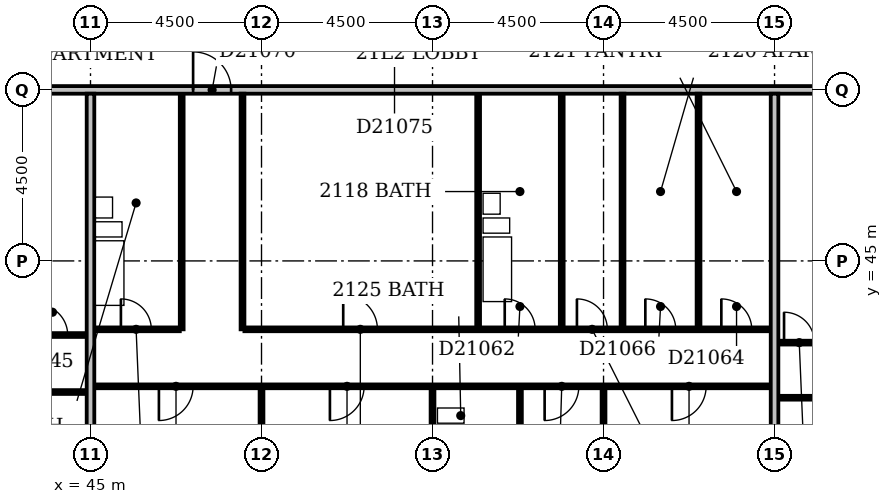
"""IFC4 building model, lengths in metres.
Left out: names, types, materials, properties, quantities, classifications, styles, units other than length and angle.
Written with IfcOpenShell. Run it as: python <this file> out.ifc"""

import sys

from ifc_helpers import new_model, si_unit, direction, frame, frame_2d, origin, place, context, subcontext, project, spatial, rectangle, extrude, element, fill, save


model = new_model("IFC4")
c1 = context("Model", 3, precision=1e-05, world=origin(), true_north=direction((0.0, 1.0)))
c2 = subcontext(c1, "Body", "Model", "MODEL_VIEW")
j1 = project(units=[si_unit("LENGTHUNIT", "METRE"), si_unit("PLANEANGLEUNIT", "RADIAN")], contexts=[c1])
p1 = place(None, origin())
s1 = spatial("IfcSite", under=j1, at=p1, CompositionType="ELEMENT")
p2 = place(p1, origin())
s2 = spatial("IfcBuilding", under=s1, at=p2, CompositionType="ELEMENT")
p3 = place(p2, frame((0.0, 0.0, 86.6)))
s3 = spatial("IfcBuildingStorey", under=s2, at=p3, CompositionType="ELEMENT", Elevation=86.6)
p4 = place(p3, frame((45.0, 36.6, 0.0), z_axis=(0.0, 0.0, 1.0), x_axis=(0.0, 1.0, 0.0)))
e1 = element("IfcWall", 1, at=p4, inside=s3, PredefinedType="PARTITIONING", context=c2, shape_type="SweptSolid", body=[
    extrude(rectangle(XDim=12.8, YDim=0.2, at=frame_2d((6.4, 0.0))), origin(), (0.0, 0.0, 1.0), 2.6),
])
p5 = place(p3, frame((49.5, 36.6, 0.0), z_axis=(0.0, 0.0, 1.0), x_axis=(0.0, 1.0, 0.0)))
e2 = element("IfcWall", 2, at=p5, inside=s3, PredefinedType="PARTITIONING", context=c2, shape_type="SweptSolid", body=[
    extrude(rectangle(XDim=5.05, YDim=0.1, at=frame_2d((2.525, 0.0))), origin(), (0.0, 0.0, 1.0), 3.3),
])
p6 = place(p3, frame((54.0, 36.6, 0.0), z_axis=(0.0, 0.0, 1.0), x_axis=(0.0, 1.0, 0.0)))
e3 = element("IfcWall", 3, at=p6, inside=s3, PredefinedType="PARTITIONING", context=c2, shape_type="SweptSolid", body=[
    extrude(rectangle(XDim=5.05, YDim=0.1, at=frame_2d((2.525, 0.0))), origin(), (0.0, 0.0, 1.0), 2.6),
])
p7 = place(p3, frame((58.5, 36.6, 0.0), z_axis=(0.0, 0.0, 1.0), x_axis=(0.0, 1.0, 0.0)))
e4 = element("IfcWall", 4, at=p7, inside=s3, PredefinedType="PARTITIONING", context=c2, shape_type="SweptSolid", body=[
    extrude(rectangle(XDim=5.05, YDim=0.1, at=frame_2d((2.525, 0.0))), origin(), (0.0, 0.0, 1.0), 3.3),
])
p8 = place(p3, frame((63.0, 36.6, 0.0), z_axis=(0.0, 0.0, 1.0), x_axis=(0.0, 1.0, 0.0)))
e5 = element("IfcWall", 5, at=p8, inside=s3, PredefinedType="PARTITIONING", context=c2, shape_type="SweptSolid", body=[
    extrude(rectangle(XDim=12.8, YDim=0.2, at=frame_2d((6.4, 0.0))), origin(), (0.0, 0.0, 1.0), 2.4),
])
p9 = place(p3, frame((56.3, 38.8, 0.0), z_axis=(0.0, 0.0, 1.0), x_axis=(0.0, 1.0, 0.0)))
e6 = element("IfcWall", 6, at=p9, inside=s3, PredefinedType="PLUMBINGWALL", context=c2, shape_type="SweptSolid", body=[
    extrude(rectangle(XDim=2.85, YDim=0.1, at=frame_2d((1.425, 0.0))), origin(), (0.0, 0.0, 1.0), 3.3),
])
p10 = place(p9, frame((1.05, 0.0, 0.0)))
e7 = element("IfcOpeningElement", 7, at=p10, cuts=e6, PredefinedType="OPENING", context=c2, shape_type="SweptSolid", body=[
    extrude(rectangle(XDim=0.8, YDim=2.1, at=frame_2d((0.4, 1.05))), frame((0.0, 0.062, 0.0), z_axis=(0.0, -1.0, 0.0), x_axis=(1.0, 0.0, 0.0)), (0.0, 0.0, 1.0), 0.124),
])
p11 = place(p3, frame((63.1, 41.4, 0.0), z_axis=(0.0, 0.0, 1.0), x_axis=(1.0, 0.0, 0.0)))
e8 = element("IfcWall", 8, at=p11, inside=s3, PredefinedType="PARTITIONING", context=c2, shape_type="SweptSolid", body=[
    extrude(rectangle(XDim=5.0, YDim=0.1, at=frame_2d((2.5, 0.0))), origin(), (0.0, 0.0, 1.0), 3.3),
])
p12 = place(p11, frame((1.7, 0.0, 0.0)))
e9 = element("IfcOpeningElement", 9, at=p12, cuts=e8, PredefinedType="OPENING", context=c2, shape_type="SweptSolid", body=[
    extrude(rectangle(XDim=0.9, YDim=2.1, at=frame_2d((0.45, 1.05))), frame((0.0, 0.062, 0.0), z_axis=(0.0, -1.0, 0.0), x_axis=(1.0, 0.0, 0.0)), (0.0, 0.0, 1.0), 0.124),
])
p13 = place(p3, frame((31.6, 41.55, 0.0), z_axis=(0.0, 0.0, 1.0), x_axis=(1.0, 0.0, 0.0)))
e10 = element("IfcWall", 10, at=p13, inside=s3, PredefinedType="PARTITIONING", context=c2, shape_type="SweptSolid", body=[
    extrude(rectangle(XDim=13.3, YDim=0.1, at=frame_2d((6.65, 0.0))), origin(), (0.0, 0.0, 1.0), 3.3),
])
p14 = place(p13, frame((3.9, 0.0, 0.0)))
e11 = element("IfcOpeningElement", 11, at=p14, cuts=e10, PredefinedType="OPENING", context=c2, shape_type="SweptSolid", body=[
    extrude(rectangle(XDim=0.9, YDim=2.1, at=frame_2d((0.45, 1.05))), frame((0.0, 0.062, 0.0), z_axis=(0.0, -1.0, 0.0), x_axis=(1.0, 0.0, 0.0)), (0.0, 0.0, 1.0), 0.124),
])
p15 = place(p13, frame((10.7, 0.0, 0.0)))
e12 = element("IfcOpeningElement", 12, at=p15, cuts=e10, PredefinedType="OPENING", context=c2, shape_type="SweptSolid", body=[
    extrude(rectangle(XDim=0.9, YDim=2.1, at=frame_2d((0.45, 1.05))), frame((0.0, 0.062, 0.0), z_axis=(0.0, -1.0, 0.0), x_axis=(1.0, 0.0, 0.0)), (0.0, 0.0, 1.0), 0.124),
])
p16 = place(p3, frame((45.1, 41.7, 0.0), z_axis=(0.0, 0.0, 1.0), x_axis=(1.0, 0.0, 0.0)))
e13 = element("IfcWall", 13, at=p16, inside=s3, PredefinedType="PARTITIONING", context=c2, shape_type="SweptSolid", body=[
    extrude(rectangle(XDim=17.8, YDim=0.1, at=frame_2d((8.9, 0.0))), origin(), (0.0, 0.0, 1.0), 3.3),
])
p17 = place(p16, frame((1.7, 0.0, 0.0)))
e14 = element("IfcOpeningElement", 14, at=p17, cuts=e13, PredefinedType="OPENING", context=c2, shape_type="SweptSolid", body=[
    extrude(rectangle(XDim=0.9, YDim=2.1, at=frame_2d((0.45, 1.05))), frame((0.0, 0.062, 0.0), z_axis=(0.0, -1.0, 0.0), x_axis=(1.0, 0.0, 0.0)), (0.0, 0.0, 1.0), 0.124),
])
p18 = place(p16, frame((6.2, 0.0, 0.0)))
e15 = element("IfcOpeningElement", 15, at=p18, cuts=e13, PredefinedType="OPENING", context=c2, shape_type="SweptSolid", body=[
    extrude(rectangle(XDim=0.9, YDim=2.1, at=frame_2d((0.45, 1.05))), frame((0.0, 0.062, 0.0), z_axis=(0.0, -1.0, 0.0), x_axis=(1.0, 0.0, 0.0)), (0.0, 0.0, 1.0), 0.124),
])
p19 = place(p16, frame((11.85, 0.0, 0.0)))
e16 = element("IfcOpeningElement", 16, at=p19, cuts=e13, PredefinedType="OPENING", context=c2, shape_type="SweptSolid", body=[
    extrude(rectangle(XDim=0.9, YDim=2.1, at=frame_2d((0.45, 1.05))), frame((0.0, 0.062, 0.0), z_axis=(0.0, -1.0, 0.0), x_axis=(1.0, 0.0, 0.0)), (0.0, 0.0, 1.0), 0.124),
])
p20 = place(p16, frame((15.2, 0.0, 0.0)))
e17 = element("IfcOpeningElement", 17, at=p20, cuts=e13, PredefinedType="OPENING", context=c2, shape_type="SweptSolid", body=[
    extrude(rectangle(XDim=0.9, YDim=2.1, at=frame_2d((0.45, 1.05))), frame((0.0, 0.062, 0.0), z_axis=(0.0, -1.0, 0.0), x_axis=(1.0, 0.0, 0.0)), (0.0, 0.0, 1.0), 0.124),
])
p21 = place(p3, frame((63.1, 42.85, 0.0), z_axis=(0.0, 0.0, 1.0), x_axis=(1.0, 0.0, 0.0)))
e18 = element("IfcWall", 18, at=p21, inside=s3, PredefinedType="PARTITIONING", context=c2, shape_type="SweptSolid", body=[
    extrude(rectangle(XDim=1.15, YDim=0.1, at=frame_2d((0.575, 0.0))), origin(), (0.0, 0.0, 1.0), 3.3),
])
p22 = place(p21, frame((0.15, 0.0, 0.0)))
e19 = element("IfcOpeningElement", 19, at=p22, cuts=e18, PredefinedType="OPENING", context=c2, shape_type="SweptSolid", body=[
    extrude(rectangle(XDim=0.8, YDim=2.1, at=frame_2d((0.4, 1.05))), frame((0.0, 0.062, 0.0), z_axis=(0.0, -1.0, 0.0), x_axis=(1.0, 0.0, 0.0)), (0.0, 0.0, 1.0), 0.124),
])
p23 = place(p3, frame((33.15, 43.05, 0.0), z_axis=(0.0, 0.0, 1.0), x_axis=(1.0, 0.0, 0.0)))
e20 = element("IfcWall", 20, at=p23, inside=s3, PredefinedType="PARTITIONING", context=c2, shape_type="SweptSolid", body=[
    extrude(rectangle(XDim=11.75, YDim=0.1, at=frame_2d((5.875, 0.0))), origin(), (0.0, 0.0, 1.0), 3.3),
])
p24 = place(p23, frame((5.15, 0.0, 0.0)))
e21 = element("IfcOpeningElement", 21, at=p24, cuts=e20, PredefinedType="OPENING", context=c2, shape_type="SweptSolid", body=[
    extrude(rectangle(XDim=0.8, YDim=2.1, at=frame_2d((0.4, 1.05))), frame((0.0, 0.062, 0.0), z_axis=(0.0, -1.0, 0.0), x_axis=(1.0, 0.0, 0.0)), (0.0, 0.0, 1.0), 0.124),
])
p25 = place(p23, frame((1.7, 0.0, 0.0)))
e22 = element("IfcOpeningElement", 22, at=p25, cuts=e20, PredefinedType="OPENING", context=c2, shape_type="SweptSolid", body=[
    extrude(rectangle(XDim=0.9, YDim=2.1, at=frame_2d((0.45, 1.05))), frame((0.0, 0.062, 0.0), z_axis=(0.0, -1.0, 0.0), x_axis=(1.0, 0.0, 0.0)), (0.0, 0.0, 1.0), 0.124),
])
p26 = place(p23, frame((8.65, 0.0, 0.0)))
e23 = element("IfcOpeningElement", 23, at=p26, cuts=e20, PredefinedType="OPENING", context=c2, shape_type="SweptSolid", body=[
    extrude(rectangle(XDim=0.8, YDim=2.1, at=frame_2d((0.4, 1.05))), frame((0.0, 0.062, 0.0), z_axis=(0.0, -1.0, 0.0), x_axis=(1.0, 0.0, 0.0)), (0.0, 0.0, 1.0), 0.124),
])
p27 = place(p23, frame((10.45, 0.0, 0.0)))
e24 = element("IfcOpeningElement", 24, at=p27, cuts=e20, PredefinedType="OPENING", context=c2, shape_type="SweptSolid", body=[
    extrude(rectangle(XDim=0.8, YDim=2.1, at=frame_2d((0.4, 1.05))), frame((0.0, 0.062, 0.0), z_axis=(0.0, -1.0, 0.0), x_axis=(1.0, 0.0, 0.0)), (0.0, 0.0, 1.0), 0.124),
])
p28 = place(p23, frame((7.1, 0.0, 0.0)))
e25 = element("IfcOpeningElement", 25, at=p28, cuts=e20, PredefinedType="OPENING", context=c2, shape_type="SweptSolid", body=[
    extrude(rectangle(XDim=0.8, YDim=2.1, at=frame_2d((0.4, 1.05))), frame((0.0, 0.062, 0.0), z_axis=(0.0, -1.0, 0.0), x_axis=(1.0, 0.0, 0.0)), (0.0, 0.0, 1.0), 0.124),
])
p29 = place(p3, frame((45.1, 43.2, 0.0), z_axis=(0.0, 0.0, 1.0), x_axis=(1.0, 0.0, 0.0)))
e26 = element("IfcWall", 26, at=p29, inside=s3, PredefinedType="PARTITIONING", context=c2, shape_type="SweptSolid", body=[
    extrude(rectangle(XDim=2.25, YDim=0.1, at=frame_2d((1.125, 0.0))), origin(), (0.0, 0.0, 1.0), 3.3),
])
p30 = place(p29, frame((0.7, 0.0, 0.0)))
e27 = element("IfcOpeningElement", 27, at=p30, cuts=e26, PredefinedType="OPENING", context=c2, shape_type="SweptSolid", body=[
    extrude(rectangle(XDim=0.8, YDim=2.1, at=frame_2d((0.4, 1.05))), frame((0.0, 0.062, 0.0), z_axis=(0.0, -1.0, 0.0), x_axis=(1.0, 0.0, 0.0)), (0.0, 0.0, 1.0), 0.124),
])
p31 = place(p3, frame((47.4, 43.2, 0.0), z_axis=(0.0, 0.0, 1.0), x_axis=(0.0, 1.0, 0.0)))
e28 = element("IfcWall", 28, at=p31, inside=s3, PredefinedType="PLUMBINGWALL", context=c2, shape_type="SweptSolid", body=[
    extrude(rectangle(XDim=6.2, YDim=0.1, at=frame_2d((3.1, 0.0))), origin(), (0.0, 0.0, 1.0), 3.3),
])
p32 = place(p3, frame((49.0, 43.2, 0.0), z_axis=(0.0, 0.0, 1.0), x_axis=(0.0, 1.0, 0.0)))
e29 = element("IfcWall", 29, at=p32, inside=s3, PredefinedType="PARTITIONING", context=c2, shape_type="SweptSolid", body=[
    extrude(rectangle(XDim=6.2, YDim=0.1, at=frame_2d((3.1, 0.0))), origin(), (0.0, 0.0, 1.0), 3.3),
])
p33 = place(p3, frame((49.05, 43.2, 0.0), z_axis=(0.0, 0.0, 1.0), x_axis=(1.0, 0.0, 0.0)))
e30 = element("IfcWall", 30, at=p33, inside=s3, PredefinedType="PARTITIONING", context=c2, shape_type="SweptSolid", body=[
    extrude(rectangle(XDim=13.85, YDim=0.1, at=frame_2d((6.925, 0.0))), origin(), (0.0, 0.0, 1.0), 3.3),
])
p34 = place(p33, frame((6.85, 0.0, 0.0)))
e31 = element("IfcOpeningElement", 31, at=p34, cuts=e30, PredefinedType="OPENING", context=c2, shape_type="SweptSolid", body=[
    extrude(rectangle(XDim=0.8, YDim=2.1, at=frame_2d((0.4, 1.05))), frame((0.0, 0.062, 0.0), z_axis=(0.0, -1.0, 0.0), x_axis=(1.0, 0.0, 0.0)), (0.0, 0.0, 1.0), 0.124),
])
p35 = place(p33, frame((2.6, 0.0, 0.0)))
e32 = element("IfcOpeningElement", 32, at=p35, cuts=e30, PredefinedType="OPENING", context=c2, shape_type="SweptSolid", body=[
    extrude(rectangle(XDim=0.9, YDim=2.1, at=frame_2d((0.45, 1.05))), frame((0.0, 0.062, 0.0), z_axis=(0.0, -1.0, 0.0), x_axis=(1.0, 0.0, 0.0)), (0.0, 0.0, 1.0), 0.124),
])
p36 = place(p33, frame((12.55, 0.0, 0.0)))
e33 = element("IfcOpeningElement", 33, at=p36, cuts=e30, PredefinedType="OPENING", context=c2, shape_type="SweptSolid", body=[
    extrude(rectangle(XDim=0.8, YDim=2.1, at=frame_2d((0.4, 1.05))), frame((0.0, 0.062, 0.0), z_axis=(0.0, -1.0, 0.0), x_axis=(1.0, 0.0, 0.0)), (0.0, 0.0, 1.0), 0.124),
])
p37 = place(p33, frame((8.75, 0.0, 0.0)))
e34 = element("IfcOpeningElement", 34, at=p37, cuts=e30, PredefinedType="OPENING", context=c2, shape_type="SweptSolid", body=[
    extrude(rectangle(XDim=0.8, YDim=2.1, at=frame_2d((0.4, 1.05))), frame((0.0, 0.062, 0.0), z_axis=(0.0, -1.0, 0.0), x_axis=(1.0, 0.0, 0.0)), (0.0, 0.0, 1.0), 0.124),
])
p38 = place(p33, frame((10.55, 0.0, 0.0)))
e35 = element("IfcOpeningElement", 35, at=p38, cuts=e30, PredefinedType="OPENING", context=c2, shape_type="SweptSolid", body=[
    extrude(rectangle(XDim=0.8, YDim=2.1, at=frame_2d((0.4, 1.05))), frame((0.0, 0.062, 0.0), z_axis=(0.0, -1.0, 0.0), x_axis=(1.0, 0.0, 0.0)), (0.0, 0.0, 1.0), 0.124),
])
for number, where, z_axis, x_axis in (
    (36, (55.2, 43.25, 0.0), (0.0, 0.0, 1.0), (0.0, 1.0, 0.0)),
    (37, (57.4, 43.25, 0.0), (0.0, 0.0, 1.0), (0.0, 1.0, 0.0)),
):
    element("IfcWall", number, at=place(p3, frame(where, z_axis=z_axis, x_axis=x_axis)), inside=s3, PredefinedType="PLUMBINGWALL", context=c2, shape_type="SweptSolid", body=[
        extrude(rectangle(XDim=6.15, YDim=0.1, at=frame_2d((3.075, 0.0))), origin(), (0.0, 0.0, 1.0), 3.3),
    ])
for number, where, z_axis, x_axis in (
    (38, (59.0, 43.25, 0.0), (0.0, 0.0, 1.0), (0.0, 1.0, 0.0)),
    (39, (61.0, 43.25, 0.0), (0.0, 0.0, 1.0), (0.0, 1.0, 0.0)),
):
    element("IfcWall", number, at=place(p3, frame(where, z_axis=z_axis, x_axis=x_axis)), inside=s3, PredefinedType="PARTITIONING", context=c2, shape_type="SweptSolid", body=[
        extrude(rectangle(XDim=6.15, YDim=0.1, at=frame_2d((3.075, 0.0))), origin(), (0.0, 0.0, 1.0), 3.3),
    ])
p39 = place(p3, frame((9.1, 49.5, 0.0), z_axis=(0.0, 0.0, 1.0), x_axis=(1.0, 0.0, 0.0)))
e40 = element("IfcWall", 40, at=p39, inside=s3, PredefinedType="PARTITIONING", context=c2, shape_type="SweptSolid", body=[
    extrude(rectangle(XDim=57.8, YDim=0.2, at=frame_2d((28.9, 0.0))), origin(), (0.0, 0.0, 1.0), 3.3),
])
p40 = place(p39, frame((13.7, 0.0, 0.0)))
e41 = element("IfcOpeningElement", 41, at=p40, cuts=e40, PredefinedType="OPENING", context=c2, shape_type="SweptSolid", body=[
    extrude(rectangle(XDim=1.0, YDim=2.1, at=frame_2d((0.5, 1.05))), frame((0.0, 0.112, 0.0), z_axis=(0.0, -1.0, 0.0), x_axis=(1.0, 0.0, 0.0)), (0.0, 0.0, 1.0), 0.224),
])
p41 = place(p39, frame((22.7, 0.0, 0.0)))
e42 = element("IfcOpeningElement", 42, at=p41, cuts=e40, PredefinedType="OPENING", context=c2, shape_type="SweptSolid", body=[
    extrude(rectangle(XDim=1.0, YDim=2.1, at=frame_2d((0.5, 1.05))), frame((0.0, 0.112, 0.0), z_axis=(0.0, -1.0, 0.0), x_axis=(1.0, 0.0, 0.0)), (0.0, 0.0, 1.0), 0.224),
])
p42 = place(p39, frame((38.6, 0.0, 0.0)))
e43 = element("IfcOpeningElement", 43, at=p42, cuts=e40, PredefinedType="OPENING", context=c2, shape_type="SweptSolid", body=[
    extrude(rectangle(XDim=1.0, YDim=2.1, at=frame_2d((0.5, 1.05))), frame((0.0, 0.112, 0.0), z_axis=(0.0, -1.0, 0.0), x_axis=(1.0, 0.0, 0.0)), (0.0, 0.0, 1.0), 0.224),
])
p43 = place(p39, frame((55.45, 0.0, 0.0)))
e44 = element("IfcOpeningElement", 44, at=p43, cuts=e40, PredefinedType="OPENING", context=c2, shape_type="SweptSolid", body=[
    extrude(rectangle(XDim=1.0, YDim=2.1, at=frame_2d((0.5, 1.05))), frame((0.0, 0.112, 0.0), z_axis=(0.0, -1.0, 0.0), x_axis=(1.0, 0.0, 0.0)), (0.0, 0.0, 1.0), 0.224),
])
p44 = place(p39, frame((6.15, 0.0, 0.0)))
e45 = element("IfcOpeningElement", 45, at=p44, cuts=e40, PredefinedType="OPENING", context=c2, shape_type="SweptSolid", body=[
    extrude(rectangle(XDim=0.9, YDim=2.1, at=frame_2d((0.45, 1.05))), frame((0.0, 0.112, 0.0), z_axis=(0.0, -1.0, 0.0), x_axis=(1.0, 0.0, 0.0)), (0.0, 0.0, 1.0), 0.224),
])
p45 = place(p17, frame((0.9, 0.0, 0.0), z_axis=(0.0, 0.0, 1.0), x_axis=(-1.0, 0.0, 0.0)))
e46 = element("IfcDoor", 46, at=p45, inside=s3, OperationType="SINGLE_SWING_RIGHT", PredefinedType="DOOR", context=c2, shape_type="SweptSolid", body=[
    extrude(rectangle(XDim=0.9, YDim=2.1, at=frame_2d((0.45, 1.05))), frame((0.0, 0.025, 0.0), z_axis=(0.0, -1.0, 0.0), x_axis=(1.0, 0.0, 0.0)), (0.0, 0.0, 1.0), 0.05),
])
fill(e14, e46)
p46 = place(p18, frame((0.9, 0.0, 0.0), z_axis=(0.0, 0.0, 1.0), x_axis=(-1.0, 0.0, 0.0)))
e47 = element("IfcDoor", 47, at=p46, inside=s3, OperationType="SINGLE_SWING_RIGHT", PredefinedType="DOOR", context=c2, shape_type="SweptSolid", body=[
    extrude(rectangle(XDim=0.9, YDim=2.1, at=frame_2d((0.45, 1.05))), frame((0.0, 0.025, 0.0), z_axis=(0.0, -1.0, 0.0), x_axis=(1.0, 0.0, 0.0)), (0.0, 0.0, 1.0), 0.05),
])
fill(e15, e47)
p47 = place(p19, frame((0.9, 0.0, 0.0), z_axis=(0.0, 0.0, 1.0), x_axis=(-1.0, 0.0, 0.0)))
e48 = element("IfcDoor", 48, at=p47, inside=s3, OperationType="SINGLE_SWING_RIGHT", PredefinedType="DOOR", context=c2, shape_type="SweptSolid", body=[
    extrude(rectangle(XDim=0.9, YDim=2.1, at=frame_2d((0.45, 1.05))), frame((0.0, 0.025, 0.0), z_axis=(0.0, -1.0, 0.0), x_axis=(1.0, 0.0, 0.0)), (0.0, 0.0, 1.0), 0.05),
])
fill(e16, e48)
p48 = place(p20, frame((0.9, 0.0, 0.0), z_axis=(0.0, 0.0, 1.0), x_axis=(-1.0, 0.0, 0.0)))
e49 = element("IfcDoor", 49, at=p48, inside=s3, OperationType="SINGLE_SWING_RIGHT", PredefinedType="DOOR", context=c2, shape_type="SweptSolid", body=[
    extrude(rectangle(XDim=0.9, YDim=2.1, at=frame_2d((0.45, 1.05))), frame((0.0, 0.025, 0.0), z_axis=(0.0, -1.0, 0.0), x_axis=(1.0, 0.0, 0.0)), (0.0, 0.0, 1.0), 0.05),
])
fill(e17, e49)
p49 = place(p22, origin())
e50 = element("IfcDoor", 50, at=p49, inside=s3, OperationType="SINGLE_SWING_LEFT", PredefinedType="DOOR", context=c2, shape_type="SweptSolid", body=[
    extrude(rectangle(XDim=0.8, YDim=2.1, at=frame_2d((0.4, 1.05))), frame((0.0, 0.025, 0.0), z_axis=(0.0, -1.0, 0.0), x_axis=(1.0, 0.0, 0.0)), (0.0, 0.0, 1.0), 0.05),
])
fill(e19, e50)
p50 = place(p27, origin())
e51 = element("IfcDoor", 51, at=p50, inside=s3, OperationType="SINGLE_SWING_LEFT", PredefinedType="DOOR", context=c2, shape_type="SweptSolid", body=[
    extrude(rectangle(XDim=0.8, YDim=2.1, at=frame_2d((0.4, 1.05))), frame((0.0, 0.025, 0.0), z_axis=(0.0, -1.0, 0.0), x_axis=(1.0, 0.0, 0.0)), (0.0, 0.0, 1.0), 0.05),
])
fill(e24, e51)
p51 = place(p30, origin())
e52 = element("IfcDoor", 52, at=p51, inside=s3, OperationType="SINGLE_SWING_LEFT", PredefinedType="DOOR", context=c2, shape_type="SweptSolid", body=[
    extrude(rectangle(XDim=0.8, YDim=2.1, at=frame_2d((0.4, 1.05))), frame((0.0, 0.025, 0.0), z_axis=(0.0, -1.0, 0.0), x_axis=(1.0, 0.0, 0.0)), (0.0, 0.0, 1.0), 0.05),
])
fill(e27, e52)
p52 = place(p34, origin())
e53 = element("IfcDoor", 53, at=p52, inside=s3, OperationType="SINGLE_SWING_LEFT", PredefinedType="DOOR", context=c2, shape_type="SweptSolid", body=[
    extrude(rectangle(XDim=0.8, YDim=2.1, at=frame_2d((0.4, 1.05))), frame((0.0, 0.025, 0.0), z_axis=(0.0, -1.0, 0.0), x_axis=(1.0, 0.0, 0.0)), (0.0, 0.0, 1.0), 0.05),
])
fill(e31, e53)
p53 = place(p35, origin())
e54 = element("IfcDoor", 54, at=p53, inside=s3, OperationType="SINGLE_SWING_LEFT", PredefinedType="DOOR", context=c2, shape_type="SweptSolid", body=[
    extrude(rectangle(XDim=0.9, YDim=2.1, at=frame_2d((0.45, 1.05))), frame((0.0, 0.025, 0.0), z_axis=(0.0, -1.0, 0.0), x_axis=(1.0, 0.0, 0.0)), (0.0, 0.0, 1.0), 0.05),
])
fill(e32, e54)
p54 = place(p36, origin())
e55 = element("IfcDoor", 55, at=p54, inside=s3, OperationType="SINGLE_SWING_LEFT", PredefinedType="DOOR", context=c2, shape_type="SweptSolid", body=[
    extrude(rectangle(XDim=0.8, YDim=2.1, at=frame_2d((0.4, 1.05))), frame((0.0, 0.025, 0.0), z_axis=(0.0, -1.0, 0.0), x_axis=(1.0, 0.0, 0.0)), (0.0, 0.0, 1.0), 0.05),
])
fill(e33, e55)
p55 = place(p37, origin())
e56 = element("IfcDoor", 56, at=p55, inside=s3, OperationType="SINGLE_SWING_LEFT", PredefinedType="DOOR", context=c2, shape_type="SweptSolid", body=[
    extrude(rectangle(XDim=0.8, YDim=2.1, at=frame_2d((0.4, 1.05))), frame((0.0, 0.025, 0.0), z_axis=(0.0, -1.0, 0.0), x_axis=(1.0, 0.0, 0.0)), (0.0, 0.0, 1.0), 0.05),
])
fill(e34, e56)
p56 = place(p38, origin())
e57 = element("IfcDoor", 57, at=p56, inside=s3, OperationType="SINGLE_SWING_LEFT", PredefinedType="DOOR", context=c2, shape_type="SweptSolid", body=[
    extrude(rectangle(XDim=0.8, YDim=2.1, at=frame_2d((0.4, 1.05))), frame((0.0, 0.025, 0.0), z_axis=(0.0, -1.0, 0.0), x_axis=(1.0, 0.0, 0.0)), (0.0, 0.0, 1.0), 0.05),
])
fill(e35, e57)
p57 = place(p42, origin())
e58 = element("IfcDoor", 58, at=p57, inside=s3, OperationType="SINGLE_SWING_LEFT", PredefinedType="DOOR", context=c2, shape_type="SweptSolid", body=[
    extrude(rectangle(XDim=1.0, YDim=2.1, at=frame_2d((0.5, 1.05))), frame((0.0, 0.025, 0.0), z_axis=(0.0, -1.0, 0.0), x_axis=(1.0, 0.0, 0.0)), (0.0, 0.0, 1.0), 0.05),
])
fill(e43, e58)
save(model, sys.argv[1])
